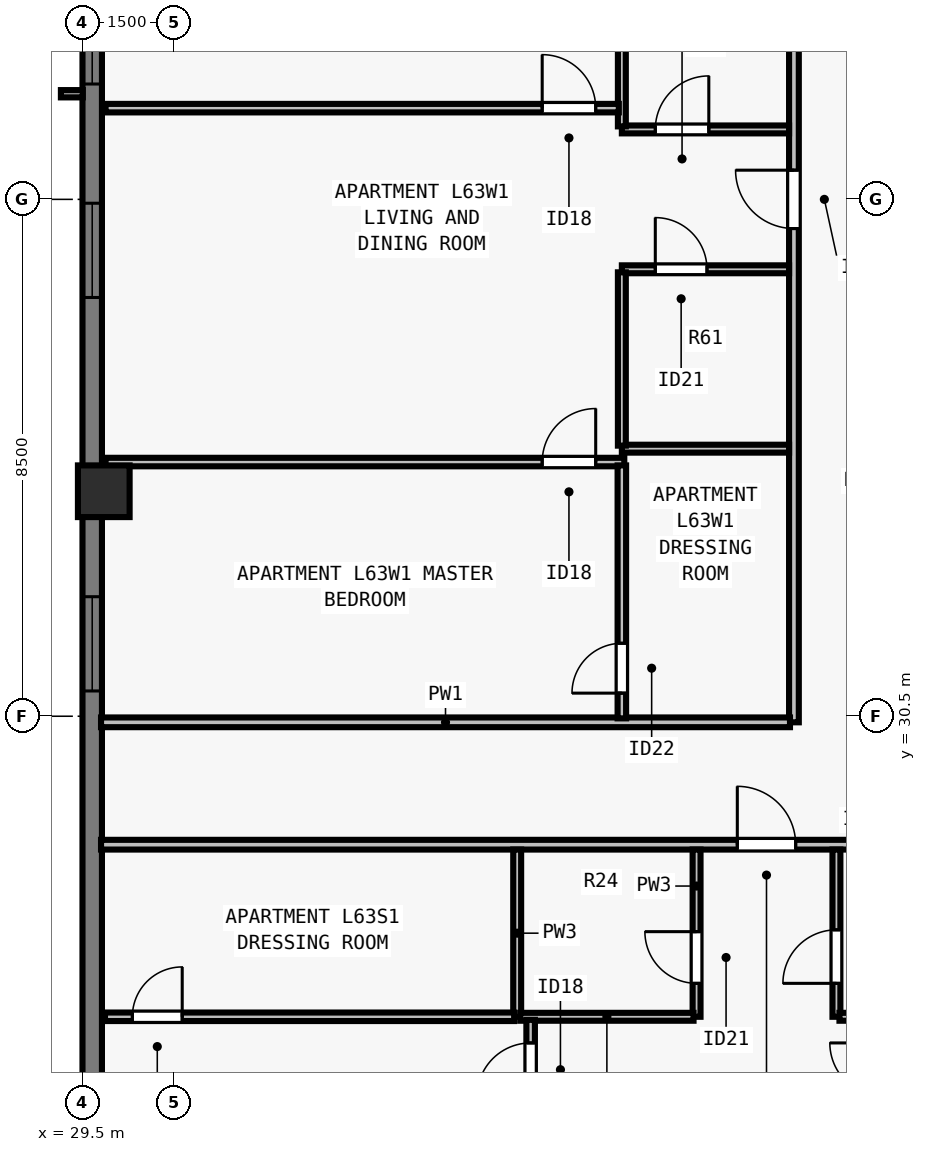
"""IFC4 building model, lengths in metres.
Left out: names, types, materials, properties, quantities, classifications, styles, units other than length and angle.
Written with IfcOpenShell. Run it as: python <this file> out.ifc"""

import sys

from ifc_helpers import new_model, si_unit, direction, frame, frame_2d, origin, origin_2d, place, context, subcontext, project, spatial, rectangle, extrude, element, fill, save


model = new_model("IFC4")
c1 = context("Model", 3, precision=1e-05, world=origin(), true_north=direction((0.0, 1.0)))
c2 = subcontext(c1, "Body", "Model", "MODEL_VIEW")
j1 = project(units=[si_unit("LENGTHUNIT", "METRE"), si_unit("PLANEANGLEUNIT", "RADIAN")], contexts=[c1])
p1 = place(None, origin())
s1 = spatial("IfcSite", under=j1, at=p1, CompositionType="ELEMENT")
p2 = place(p1, origin())
s2 = spatial("IfcBuilding", under=s1, at=p2, CompositionType="ELEMENT")
p3 = place(p2, frame((0.0, 0.0, 230.5)))
s3 = spatial("IfcBuildingStorey", under=s2, at=p3, CompositionType="ELEMENT", Elevation=230.5)
p4 = place(p3, frame((29.85, 34.2, 0.0), z_axis=(0.0, 0.0, 1.0), x_axis=(0.0, 1.0, 0.0)))
e1 = element("IfcColumn", 1, at=p4, inside=s3, PredefinedType="COLUMN", context=c2, shape_type="SweptSolid", body=[
    extrude(rectangle(XDim=0.85, YDim=0.85, at=origin_2d()), origin(), (0.0, 0.0, 1.0), 3.5),
])
p5 = place(p3, frame((29.66, 21.5, 0.0), z_axis=(0.0, 0.0, 1.0), x_axis=(0.0, 1.0, 0.0)))
e2 = element("IfcWall", 2, at=p5, inside=s3, PredefinedType="SOLIDWALL", context=c2, shape_type="SweptSolid", body=[
    extrude(rectangle(XDim=23.402, YDim=0.32, at=frame_2d((11.701, 0.0))), origin(), (0.0, 0.0, 1.0), 3.29),
])
p6 = place(p5, frame((9.416, 0.0, 0.8)))
e3 = element("IfcOpeningElement", 3, at=p6, cuts=e2, PredefinedType="OPENING", context=c2, shape_type="SweptSolid", body=[
    extrude(rectangle(XDim=1.55, YDim=1.678, at=frame_2d((0.775, 0.839))), frame((0.0, 0.17, 0.0), z_axis=(0.0, -1.0, 0.0), x_axis=(1.0, 0.0, 0.0)), (0.0, 0.0, 1.0), 0.34),
])
p7 = place(p5, frame((15.886, 0.0, 0.8)))
e4 = element("IfcOpeningElement", 4, at=p7, cuts=e2, PredefinedType="OPENING", context=c2, shape_type="SweptSolid", body=[
    extrude(rectangle(XDim=1.55, YDim=1.678, at=frame_2d((0.775, 0.839))), frame((0.0, 0.17, 0.0), z_axis=(0.0, -1.0, 0.0), x_axis=(1.0, 0.0, 0.0)), (0.0, 0.0, 1.0), 0.34),
])
p8 = place(p5, frame((19.397, 0.0, 0.8)))
e5 = element("IfcOpeningElement", 5, at=p8, cuts=e2, PredefinedType="OPENING", context=c2, shape_type="SweptSolid", body=[
    extrude(rectangle(XDim=1.85, YDim=1.678, at=frame_2d((0.925, 0.839))), frame((0.0, 0.17, 0.0), z_axis=(0.0, -1.0, 0.0), x_axis=(1.0, 0.0, 0.0)), (0.0, 0.0, 1.0), 0.34),
])
p9 = place(p3, frame((29.805, 28.387, 0.0), z_axis=(0.0, 0.0, 1.0), x_axis=(1.0, 0.0, 0.0)))
e6 = element("IfcWall", 6, at=p9, inside=s3, PredefinedType="PARTITIONING", context=c2, shape_type="SweptSolid", body=[
    extrude(rectangle(XDim=44.39, YDim=0.16, at=frame_2d((22.195, 0.0))), origin(), (0.0, 0.0, 1.0), 2.958),
])
p10 = place(p9, frame((10.464, 0.0, 0.0)))
e7 = element("IfcOpeningElement", 7, at=p10, cuts=e6, PredefinedType="OPENING", context=c2, shape_type="SweptSolid", body=[
    extrude(rectangle(XDim=0.96, YDim=2.18, at=frame_2d((0.48, 1.09))), frame((0.0, 0.09, 0.0), z_axis=(0.0, -1.0, 0.0), x_axis=(1.0, 0.0, 0.0)), (0.0, 0.0, 1.0), 0.18),
])
p11 = place(p9, frame((32.544, 0.0, 0.0)))
e8 = element("IfcOpeningElement", 8, at=p11, cuts=e6, PredefinedType="OPENING", context=c2, shape_type="SweptSolid", body=[
    extrude(rectangle(XDim=0.96, YDim=2.18, at=frame_2d((0.48, 1.09))), frame((0.0, 0.09, 0.0), z_axis=(0.0, -1.0, 0.0), x_axis=(1.0, 0.0, 0.0)), (0.0, 0.0, 1.0), 0.18),
])
p12 = place(p3, frame((41.2, 30.4, 0.0), z_axis=(0.0, 0.0, 1.0), x_axis=(0.0, 1.0, 0.0)))
e9 = element("IfcWall", 9, at=p12, inside=s3, PredefinedType="PARTITIONING", context=c2, shape_type="SweptSolid", body=[
    extrude(rectangle(XDim=17.2, YDim=0.16, at=frame_2d((8.6, 0.0))), origin(), (0.0, 0.0, 1.0), 3.29),
])
p13 = place(p12, frame((8.12, 0.0, 0.0)))
e10 = element("IfcOpeningElement", 10, at=p13, cuts=e9, PredefinedType="OPENING", context=c2, shape_type="SweptSolid", body=[
    extrude(rectangle(XDim=0.96, YDim=2.18, at=frame_2d((0.48, 1.09))), frame((0.0, 0.09, 0.0), z_axis=(0.0, -1.0, 0.0), x_axis=(1.0, 0.0, 0.0)), (0.0, 0.0, 1.0), 0.18),
])
p14 = place(p3, frame((29.805, 30.4, 0.0), z_axis=(0.0, 0.0, 1.0), x_axis=(1.0, 0.0, 0.0)))
e11 = element("IfcWall", 11, at=p14, inside=s3, PredefinedType="PARTITIONING", context=c2, shape_type="SweptSolid", body=[
    extrude(rectangle(XDim=11.33, YDim=0.16, at=frame_2d((5.665, 0.0))), origin(), (0.0, 0.0, 1.0), 3.29),
])
p15 = place(p3, frame((36.649, 25.558, 0.0), z_axis=(0.0, 0.0, 1.0), x_axis=(0.0, 1.0, 0.0)))
e12 = element("IfcWall", 12, at=p15, inside=s3, PredefinedType="PLUMBINGWALL", context=c2, shape_type="SweptSolid", body=[
    extrude(rectangle(XDim=2.75, YDim=0.13, at=frame_2d((1.375, 0.0))), origin(), (0.0, 0.0, 1.0), 3.29),
])
p16 = place(p3, frame((39.599, 25.558, 0.0), z_axis=(0.0, 0.0, 1.0), x_axis=(0.0, 1.0, 0.0)))
e13 = element("IfcWall", 13, at=p16, inside=s3, PredefinedType="PLUMBINGWALL", context=c2, shape_type="SweptSolid", body=[
    extrude(rectangle(XDim=2.75, YDim=0.13, at=frame_2d((1.375, 0.0))), origin(), (0.0, 0.0, 1.0), 3.29),
])
p17 = place(p16, frame((0.55, 0.0, 0.0)))
e14 = element("IfcOpeningElement", 14, at=p17, cuts=e13, PredefinedType="OPENING", context=c2, shape_type="SweptSolid", body=[
    extrude(rectangle(XDim=0.85, YDim=2.08, at=frame_2d((0.425, 1.04))), frame((0.0, 0.075, 0.0), z_axis=(0.0, -1.0, 0.0), x_axis=(1.0, 0.0, 0.0)), (0.0, 0.0, 1.0), 0.15),
])
p18 = place(p3, frame((36.699, 25.558, 0.0), z_axis=(0.0, 0.0, 1.0), x_axis=(1.0, 0.0, 0.0)))
e15 = element("IfcWall", 15, at=p18, inside=s3, PredefinedType="PLUMBINGWALL", context=c2, shape_type="SweptSolid", body=[
    extrude(rectangle(XDim=2.85, YDim=0.13, at=frame_2d((1.425, 0.0))), origin(), (0.0, 0.0, 1.0), 3.29),
])
p19 = place(p3, frame((41.899, 25.558, 0.0), z_axis=(0.0, 0.0, 1.0), x_axis=(0.0, 1.0, 0.0)))
e16 = element("IfcWall", 16, at=p19, inside=s3, PredefinedType="PLUMBINGWALL", context=c2, shape_type="SweptSolid", body=[
    extrude(rectangle(XDim=2.75, YDim=0.13, at=frame_2d((1.375, 0.0))), origin(), (0.0, 0.0, 1.0), 2.573),
])
p20 = place(p19, frame((0.55, 0.0, 0.0)))
e17 = element("IfcOpeningElement", 17, at=p20, cuts=e16, PredefinedType="OPENING", context=c2, shape_type="SweptSolid", body=[
    extrude(rectangle(XDim=0.88, YDim=2.1, at=frame_2d((0.44, 1.05))), frame((0.0, 0.075, 0.0), z_axis=(0.0, -1.0, 0.0), x_axis=(1.0, 0.0, 0.0)), (0.0, 0.0, 1.0), 0.15),
])
p21 = place(p3, frame((41.949, 25.558, 0.0), z_axis=(0.0, 0.0, 1.0), x_axis=(1.0, 0.0, 0.0)))
e18 = element("IfcWall", 18, at=p21, inside=s3, PredefinedType="PLUMBINGWALL", context=c2, shape_type="SweptSolid", body=[
    extrude(rectangle(XDim=3.15, YDim=0.13, at=frame_2d((1.575, 0.0))), origin(), (0.0, 0.0, 1.0), 3.29),
])
p22 = place(p3, frame((36.87, 16.88, 0.0), z_axis=(0.0, 0.0, 1.0), x_axis=(0.0, 1.0, 0.0)))
e19 = element("IfcWall", 19, at=p22, inside=s3, PredefinedType="PARTITIONING", context=c2, shape_type="SweptSolid", body=[
    extrude(rectangle(XDim=8.628, YDim=0.14, at=frame_2d((4.314, 0.0))), origin(), (0.0, 0.0, 1.0), 2.573),
])
p23 = place(p22, frame((7.367, 0.0, 0.0)))
e20 = element("IfcOpeningElement", 20, at=p23, cuts=e19, PredefinedType="OPENING", context=c2, shape_type="SweptSolid", body=[
    extrude(rectangle(XDim=0.88, YDim=2.1, at=frame_2d((0.44, 1.05))), frame((0.0, 0.08, 0.0), z_axis=(0.0, -1.0, 0.0), x_axis=(1.0, 0.0, 0.0)), (0.0, 0.0, 1.0), 0.16),
])
p24 = place(p3, frame((29.87, 25.558, 0.0), z_axis=(0.0, 0.0, 1.0), x_axis=(1.0, 0.0, 0.0)))
e21 = element("IfcWall", 21, at=p24, inside=s3, PredefinedType="PARTITIONING", context=c2, shape_type="SweptSolid", body=[
    extrude(rectangle(XDim=6.729, YDim=0.14, at=frame_2d((3.364, 0.0))), origin(), (0.0, 0.0, 1.0), 2.958),
])
p25 = place(p24, frame((0.45, 0.0, 0.0)))
e22 = element("IfcOpeningElement", 22, at=p25, cuts=e21, PredefinedType="OPENING", context=c2, shape_type="SweptSolid", body=[
    extrude(rectangle(XDim=0.82, YDim=2.1, at=frame_2d((0.41, 1.05))), frame((0.0, 0.08, 0.0), z_axis=(0.0, -1.0, 0.0), x_axis=(1.0, 0.0, 0.0)), (0.0, 0.0, 1.0), 0.16),
])
p26 = place(p3, frame((38.37, 34.9, 0.0), z_axis=(0.0, 0.0, 1.0), x_axis=(1.0, 0.0, 0.0)))
e23 = element("IfcWall", 23, at=p26, inside=s3, PredefinedType="PLUMBINGWALL", context=c2, shape_type="SweptSolid", body=[
    extrude(rectangle(XDim=2.75, YDim=0.13, at=frame_2d((1.375, 0.0))), origin(), (0.0, 0.0, 1.0), 3.29),
])
p27 = place(p3, frame((38.37, 37.85, 0.0), z_axis=(0.0, 0.0, 1.0), x_axis=(1.0, 0.0, 0.0)))
e24 = element("IfcWall", 24, at=p27, inside=s3, PredefinedType="PLUMBINGWALL", context=c2, shape_type="SweptSolid", body=[
    extrude(rectangle(XDim=2.75, YDim=0.13, at=frame_2d((1.375, 0.0))), origin(), (0.0, 0.0, 1.0), 3.29),
])
p28 = place(p27, frame((0.55, 0.0, 0.0)))
e25 = element("IfcOpeningElement", 25, at=p28, cuts=e24, PredefinedType="OPENING", context=c2, shape_type="SweptSolid", body=[
    extrude(rectangle(XDim=0.85, YDim=2.08, at=frame_2d((0.425, 1.04))), frame((0.0, 0.075, 0.0), z_axis=(0.0, -1.0, 0.0), x_axis=(1.0, 0.0, 0.0)), (0.0, 0.0, 1.0), 0.15),
])
p29 = place(p3, frame((38.37, 34.95, 0.0), z_axis=(0.0, 0.0, 1.0), x_axis=(0.0, 1.0, 0.0)))
e26 = element("IfcWall", 26, at=p29, inside=s3, PredefinedType="PLUMBINGWALL", context=c2, shape_type="SweptSolid", body=[
    extrude(rectangle(XDim=2.85, YDim=0.13, at=frame_2d((1.425, 0.0))), origin(), (0.0, 0.0, 1.0), 3.29),
])
p30 = place(p3, frame((38.37, 40.15, 0.0), z_axis=(0.0, 0.0, 1.0), x_axis=(1.0, 0.0, 0.0)))
e27 = element("IfcWall", 27, at=p30, inside=s3, PredefinedType="PLUMBINGWALL", context=c2, shape_type="SweptSolid", body=[
    extrude(rectangle(XDim=2.75, YDim=0.13, at=frame_2d((1.375, 0.0))), origin(), (0.0, 0.0, 1.0), 3.29),
])
p31 = place(p30, frame((0.55, 0.0, 0.0)))
e28 = element("IfcOpeningElement", 28, at=p31, cuts=e27, PredefinedType="OPENING", context=c2, shape_type="SweptSolid", body=[
    extrude(rectangle(XDim=0.88, YDim=2.1, at=frame_2d((0.44, 1.05))), frame((0.0, 0.075, 0.0), z_axis=(0.0, -1.0, 0.0), x_axis=(1.0, 0.0, 0.0)), (0.0, 0.0, 1.0), 0.15),
])
p32 = place(p3, frame((38.37, 40.2, 0.0), z_axis=(0.0, 0.0, 1.0), x_axis=(0.0, 1.0, 0.0)))
e29 = element("IfcWall", 29, at=p32, inside=s3, PredefinedType="PLUMBINGWALL", context=c2, shape_type="SweptSolid", body=[
    extrude(rectangle(XDim=3.15, YDim=0.13, at=frame_2d((1.575, 0.0))), origin(), (0.0, 0.0, 1.0), 3.29),
])
p33 = place(p3, frame((29.88, 34.68, 0.0), z_axis=(0.0, 0.0, 1.0), x_axis=(1.0, 0.0, 0.0)))
e30 = element("IfcWall", 30, at=p33, inside=s3, PredefinedType="PARTITIONING", context=c2, shape_type="SweptSolid", body=[
    extrude(rectangle(XDim=8.53, YDim=0.14, at=frame_2d((4.265, 0.0))), origin(), (0.0, 0.0, 1.0), 2.958),
])
p34 = place(p33, frame((7.18, 0.0, 0.0)))
e31 = element("IfcOpeningElement", 31, at=p34, cuts=e30, PredefinedType="OPENING", context=c2, shape_type="SweptSolid", body=[
    extrude(rectangle(XDim=0.88, YDim=2.1, at=frame_2d((0.44, 1.05))), frame((0.0, 0.08, 0.0), z_axis=(0.0, -1.0, 0.0), x_axis=(1.0, 0.0, 0.0)), (0.0, 0.0, 1.0), 0.16),
])
p35 = place(p3, frame((38.37, 30.465, 0.0), z_axis=(0.0, 0.0, 1.0), x_axis=(0.0, 1.0, 0.0)))
e32 = element("IfcWall", 32, at=p35, inside=s3, PredefinedType="PARTITIONING", context=c2, shape_type="SweptSolid", body=[
    extrude(rectangle(XDim=4.16, YDim=0.14, at=frame_2d((2.08, 0.0))), origin(), (0.0, 0.0, 1.0), 3.29),
])
p36 = place(p35, frame((0.415, 0.0, 0.0)))
e33 = element("IfcOpeningElement", 33, at=p36, cuts=e32, PredefinedType="OPENING", context=c2, shape_type="SweptSolid", body=[
    extrude(rectangle(XDim=0.82, YDim=2.1, at=frame_2d((0.41, 1.05))), frame((0.0, 0.08, 0.0), z_axis=(0.0, -1.0, 0.0), x_axis=(1.0, 0.0, 0.0)), (0.0, 0.0, 1.0), 0.16),
])
p37 = place(p3, frame((29.88, 40.5, 0.0), z_axis=(0.0, 0.0, 1.0), x_axis=(1.0, 0.0, 0.0)))
e34 = element("IfcWall", 34, at=p37, inside=s3, PredefinedType="PARTITIONING", context=c2, shape_type="SweptSolid", body=[
    extrude(rectangle(XDim=8.44, YDim=0.14, at=frame_2d((4.22, 0.0))), origin(), (0.0, 0.0, 1.0), 2.958),
])
p38 = place(p37, frame((7.18, 0.0, 0.0)))
e35 = element("IfcOpeningElement", 35, at=p38, cuts=e34, PredefinedType="OPENING", context=c2, shape_type="SweptSolid", body=[
    extrude(rectangle(XDim=0.88, YDim=2.1, at=frame_2d((0.44, 1.05))), frame((0.0, 0.08, 0.0), z_axis=(0.0, -1.0, 0.0), x_axis=(1.0, 0.0, 0.0)), (0.0, 0.0, 1.0), 0.16),
])
p39 = place(p6, origin())
e36 = element("IfcWindow", 36, at=p39, inside=s3, PartitioningType="SINGLE_PANEL", PredefinedType="WINDOW", context=c2, shape_type="SweptSolid", body=[
    extrude(rectangle(XDim=1.55, YDim=1.678, at=frame_2d((0.775, 0.839))), frame((0.0, -0.05, 0.0), z_axis=(0.0, -1.0, 0.0), x_axis=(1.0, 0.0, 0.0)), (0.0, 0.0, 1.0), 0.06),
])
fill(e3, e36)
p40 = place(p7, origin())
e37 = element("IfcWindow", 37, at=p40, inside=s3, PartitioningType="SINGLE_PANEL", PredefinedType="WINDOW", context=c2, shape_type="SweptSolid", body=[
    extrude(rectangle(XDim=1.55, YDim=1.678, at=frame_2d((0.775, 0.839))), frame((0.0, -0.05, 0.0), z_axis=(0.0, -1.0, 0.0), x_axis=(1.0, 0.0, 0.0)), (0.0, 0.0, 1.0), 0.06),
])
fill(e4, e37)
p41 = place(p8, origin())
e38 = element("IfcWindow", 38, at=p41, inside=s3, PartitioningType="SINGLE_PANEL", PredefinedType="WINDOW", context=c2, shape_type="SweptSolid", body=[
    extrude(rectangle(XDim=1.85, YDim=1.678, at=frame_2d((0.925, 0.839))), frame((0.0, -0.05, 0.0), z_axis=(0.0, -1.0, 0.0), x_axis=(1.0, 0.0, 0.0)), (0.0, 0.0, 1.0), 0.06),
])
fill(e5, e38)
p42 = place(p17, origin())
e39 = element("IfcDoor", 39, at=p42, inside=s3, OperationType="SINGLE_SWING_RIGHT", PredefinedType="DOOR", context=c2, shape_type="SweptSolid", body=[
    extrude(rectangle(XDim=0.85, YDim=2.08, at=frame_2d((0.425, 1.04))), frame((0.0, 0.025, 0.0), z_axis=(0.0, -1.0, 0.0), x_axis=(1.0, 0.0, 0.0)), (0.0, 0.0, 1.0), 0.05),
])
fill(e14, e39)
p43 = place(p20, origin())
e40 = element("IfcDoor", 40, at=p43, inside=s3, OperationType="SINGLE_SWING_LEFT", PredefinedType="DOOR", context=c2, shape_type="SweptSolid", body=[
    extrude(rectangle(XDim=0.88, YDim=2.1, at=frame_2d((0.44, 1.05))), frame((0.0, 0.025, 0.0), z_axis=(0.0, -1.0, 0.0), x_axis=(1.0, 0.0, 0.0)), (0.0, 0.0, 1.0), 0.05),
])
fill(e17, e40)
p44 = place(p25, origin())
e41 = element("IfcDoor", 41, at=p44, inside=s3, OperationType="SINGLE_SWING_RIGHT", PredefinedType="DOOR", context=c2, shape_type="SweptSolid", body=[
    extrude(rectangle(XDim=0.82, YDim=2.1, at=frame_2d((0.41, 1.05))), frame((0.0, 0.025, 0.0), z_axis=(0.0, -1.0, 0.0), x_axis=(1.0, 0.0, 0.0)), (0.0, 0.0, 1.0), 0.05),
])
fill(e22, e41)
p45 = place(p23, origin())
e42 = element("IfcDoor", 42, at=p45, inside=s3, OperationType="SINGLE_SWING_LEFT", PredefinedType="DOOR", context=c2, shape_type="SweptSolid", body=[
    extrude(rectangle(XDim=0.88, YDim=2.1, at=frame_2d((0.44, 1.05))), frame((0.0, 0.025, 0.0), z_axis=(0.0, -1.0, 0.0), x_axis=(1.0, 0.0, 0.0)), (0.0, 0.0, 1.0), 0.05),
])
fill(e20, e42)
p46 = place(p10, origin())
e43 = element("IfcDoor", 43, at=p46, inside=s3, OperationType="SINGLE_SWING_LEFT", PredefinedType="DOOR", context=c2, shape_type="SweptSolid", body=[
    extrude(rectangle(XDim=0.96, YDim=2.18, at=frame_2d((0.48, 1.09))), frame((0.0, 0.025, 0.0), z_axis=(0.0, -1.0, 0.0), x_axis=(1.0, 0.0, 0.0)), (0.0, 0.0, 1.0), 0.05),
])
fill(e7, e43)
p47 = place(p28, origin())
e44 = element("IfcDoor", 44, at=p47, inside=s3, OperationType="SINGLE_SWING_LEFT", PredefinedType="DOOR", context=c2, shape_type="SweptSolid", body=[
    extrude(rectangle(XDim=0.85, YDim=2.08, at=frame_2d((0.425, 1.04))), frame((0.0, 0.025, 0.0), z_axis=(0.0, -1.0, 0.0), x_axis=(1.0, 0.0, 0.0)), (0.0, 0.0, 1.0), 0.05),
])
fill(e25, e44)
p48 = place(p31, origin())
e45 = element("IfcDoor", 45, at=p48, inside=s3, OperationType="SINGLE_SWING_RIGHT", PredefinedType="DOOR", context=c2, shape_type="SweptSolid", body=[
    extrude(rectangle(XDim=0.88, YDim=2.1, at=frame_2d((0.44, 1.05))), frame((0.0, 0.025, 0.0), z_axis=(0.0, -1.0, 0.0), x_axis=(1.0, 0.0, 0.0)), (0.0, 0.0, 1.0), 0.05),
])
fill(e28, e45)
p49 = place(p36, origin())
e46 = element("IfcDoor", 46, at=p49, inside=s3, OperationType="SINGLE_SWING_LEFT", PredefinedType="DOOR", context=c2, shape_type="SweptSolid", body=[
    extrude(rectangle(XDim=0.82, YDim=2.1, at=frame_2d((0.41, 1.05))), frame((0.0, 0.025, 0.0), z_axis=(0.0, -1.0, 0.0), x_axis=(1.0, 0.0, 0.0)), (0.0, 0.0, 1.0), 0.05),
])
fill(e33, e46)
p50 = place(p34, origin())
e47 = element("IfcDoor", 47, at=p50, inside=s3, OperationType="SINGLE_SWING_RIGHT", PredefinedType="DOOR", context=c2, shape_type="SweptSolid", body=[
    extrude(rectangle(XDim=0.88, YDim=2.1, at=frame_2d((0.44, 1.05))), frame((0.0, 0.025, 0.0), z_axis=(0.0, -1.0, 0.0), x_axis=(1.0, 0.0, 0.0)), (0.0, 0.0, 1.0), 0.05),
])
fill(e31, e47)
p51 = place(p38, origin())
e48 = element("IfcDoor", 48, at=p51, inside=s3, OperationType="SINGLE_SWING_LEFT", PredefinedType="DOOR", context=c2, shape_type="SweptSolid", body=[
    extrude(rectangle(XDim=0.88, YDim=2.1, at=frame_2d((0.44, 1.05))), frame((0.0, 0.025, 0.0), z_axis=(0.0, -1.0, 0.0), x_axis=(1.0, 0.0, 0.0)), (0.0, 0.0, 1.0), 0.05),
])
fill(e35, e48)
p52 = place(p13, origin())
e49 = element("IfcDoor", 49, at=p52, inside=s3, OperationType="SINGLE_SWING_RIGHT", PredefinedType="DOOR", context=c2, shape_type="SweptSolid", body=[
    extrude(rectangle(XDim=0.96, YDim=2.18, at=frame_2d((0.48, 1.09))), frame((0.0, 0.025, 0.0), z_axis=(0.0, -1.0, 0.0), x_axis=(1.0, 0.0, 0.0)), (0.0, 0.0, 1.0), 0.05),
])
fill(e10, e49)
save(model, sys.argv[1])
